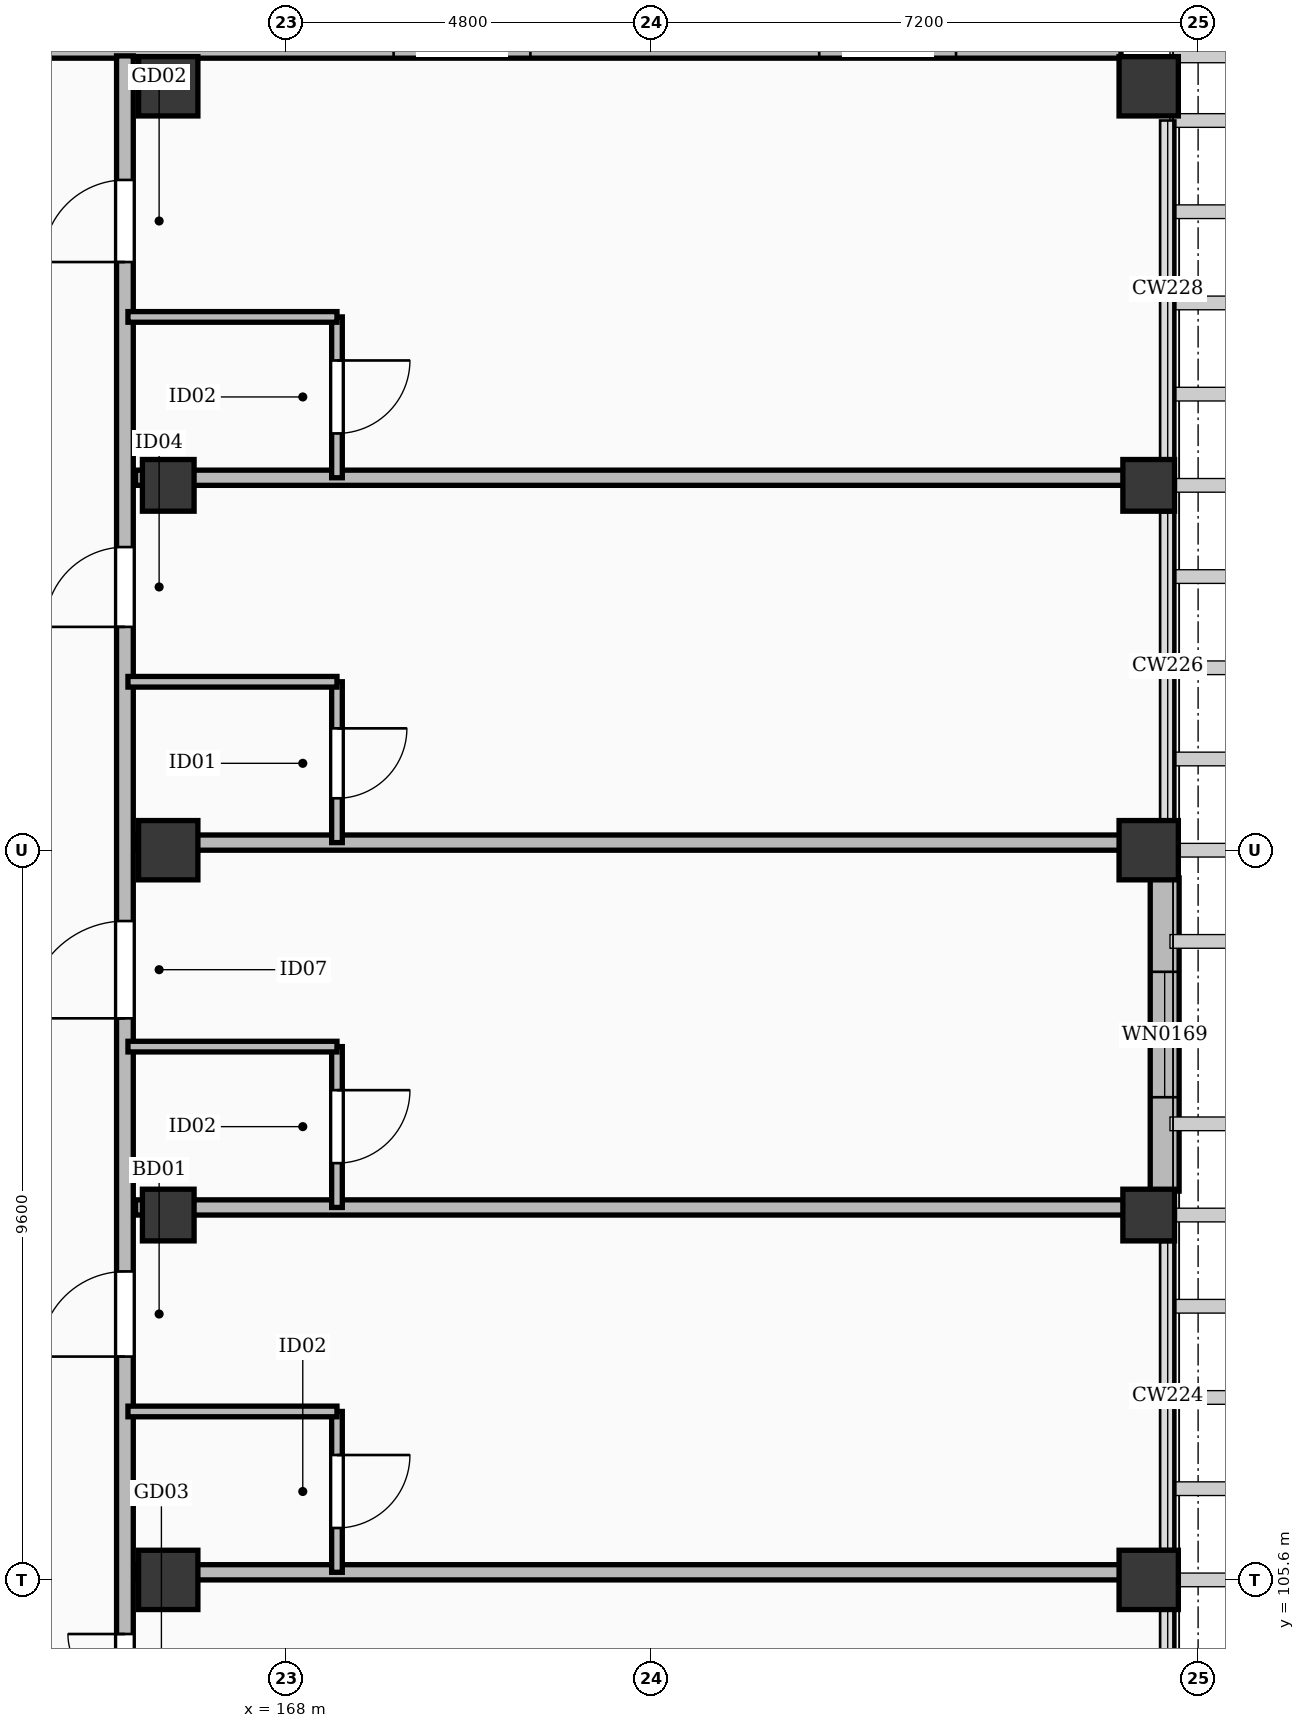
"""IFC4 building model, lengths in metres.
Left out: names, types, materials, properties, quantities, classifications, styles, units other than length and angle.
Written with IfcOpenShell. Run it as: python <this file> out.ifc"""

import sys

from ifc_helpers import new_model, si_unit, direction, frame, frame_2d, origin, origin_2d, place, context, subcontext, project, spatial, rectangle, extrude, element, fill, save


model = new_model("IFC4")
c1 = context("Model", 3, precision=1e-05, world=origin(), true_north=direction((0.0, 1.0)))
c2 = subcontext(c1, "Body", "Model", "MODEL_VIEW")
j1 = project(units=[si_unit("LENGTHUNIT", "METRE"), si_unit("PLANEANGLEUNIT", "RADIAN")], contexts=[c1])
p1 = place(None, origin())
s1 = spatial("IfcSite", under=j1, at=p1, CompositionType="ELEMENT")
p2 = place(p1, origin())
s2 = spatial("IfcBuilding", under=s1, at=p2, CompositionType="ELEMENT")
p3 = place(p2, frame((0.0, 0.0, 24.6)))
s3 = spatial("IfcBuildingStorey", under=s2, at=p3, CompositionType="ELEMENT", Elevation=24.6)
for number, where, z_axis, x_axis in (
    (1, (166.45, 105.6, 0.0), (0.0, 0.0, 1.0), (1.0, 0.0, 0.0)),
    (2, (166.45, 115.2, 0.0), (0.0, 0.0, 1.0), (1.0, 0.0, 0.0)),
    (3, (166.45, 125.25, 0.0), (0.0, 0.0, 1.0), (1.0, 0.0, 0.0)),
    (4, (179.35, 105.6, 0.0), (0.0, 0.0, 1.0), (1.0, 0.0, 0.0)),
    (5, (179.35, 115.2, 0.0), (0.0, 0.0, 1.0), (1.0, 0.0, 0.0)),
    (6, (179.35, 125.25, 0.0), (0.0, 0.0, 1.0), (1.0, 0.0, 0.0)),
):
    element("IfcColumn", number, at=place(p3, frame(where, z_axis=z_axis, x_axis=x_axis)), inside=s3, PredefinedType="COLUMN", context=c2, shape_type="SweptSolid", body=[
        extrude(rectangle(XDim=0.78, YDim=0.78, at=origin_2d()), origin(), (0.0, 0.0, 1.0), 3.6),
    ])
for number, where, z_axis, x_axis in (
    (7, (166.45, 110.4, 0.0), (0.0, 0.0, 1.0), (1.0, 0.0, 0.0)),
    (8, (166.45, 120.0, 0.0), (0.0, 0.0, 1.0), (1.0, 0.0, 0.0)),
    (9, (179.35, 110.4, 0.0), (0.0, 0.0, 1.0), (1.0, 0.0, 0.0)),
    (10, (179.35, 120.0, 0.0), (0.0, 0.0, 1.0), (1.0, 0.0, 0.0)),
):
    element("IfcColumn", number, at=place(p3, frame(where, z_axis=z_axis, x_axis=x_axis)), inside=s3, PredefinedType="COLUMN", context=c2, shape_type="SweptSolid", body=[
        extrude(rectangle(XDim=0.68, YDim=0.68, at=origin_2d()), origin(), (0.0, 0.0, 1.0), 3.6),
    ])
p4 = place(p3, frame((149.815, 125.81, 0.0), z_axis=(0.0, 0.0, 1.0), x_axis=(1.0, 0.0, 0.0)))
e11 = element("IfcWall", 11, at=p4, inside=s3, PredefinedType="SOLIDWALL", context=c2, shape_type="SweptSolid", body=[
    extrude(rectangle(XDim=29.17, YDim=0.38, at=frame_2d((14.585, 0.0))), origin(), (0.0, 0.0, 1.0), 3.34),
])
p5 = place(p4, frame((3.6, 0.0, 0.55)))
e12 = element("IfcOpeningElement", 12, at=p5, cuts=e11, PredefinedType="OPENING", context=c2, shape_type="SweptSolid", body=[
    extrude(rectangle(XDim=1.8, YDim=1.76, at=frame_2d((0.9, 0.88))), frame((0.0, 0.202, 0.0), z_axis=(0.0, -1.0, 0.0), x_axis=(1.0, 0.0, 0.0)), (0.0, 0.0, 1.0), 0.404),
])
p6 = place(p4, frame((9.2, 0.0, 0.55)))
e13 = element("IfcOpeningElement", 13, at=p6, cuts=e11, PredefinedType="OPENING", context=c2, shape_type="SweptSolid", body=[
    extrude(rectangle(XDim=1.8, YDim=1.76, at=frame_2d((0.9, 0.88))), frame((0.0, 0.202, 0.0), z_axis=(0.0, -1.0, 0.0), x_axis=(1.0, 0.0, 0.0)), (0.0, 0.0, 1.0), 0.404),
])
p7 = place(p4, frame((19.6, 0.0, 0.55)))
e14 = element("IfcOpeningElement", 14, at=p7, cuts=e11, PredefinedType="OPENING", context=c2, shape_type="SweptSolid", body=[
    extrude(rectangle(XDim=1.8, YDim=1.76, at=frame_2d((0.9, 0.88))), frame((0.0, 0.202, 0.0), z_axis=(0.0, -1.0, 0.0), x_axis=(1.0, 0.0, 0.0)), (0.0, 0.0, 1.0), 0.404),
])
p8 = place(p4, frame((25.2, 0.0, 0.55)))
e15 = element("IfcOpeningElement", 15, at=p8, cuts=e11, PredefinedType="OPENING", context=c2, shape_type="SweptSolid", body=[
    extrude(rectangle(XDim=1.8, YDim=1.76, at=frame_2d((0.9, 0.88))), frame((0.0, 0.202, 0.0), z_axis=(0.0, -1.0, 0.0), x_axis=(1.0, 0.0, 0.0)), (0.0, 0.0, 1.0), 0.404),
])
p9 = place(p3, frame((179.56, 114.835, 0.0), z_axis=(0.0, 0.0, 1.0), x_axis=(0.0, -1.0, 0.0)))
e16 = element("IfcWall", 16, at=p9, inside=s3, PredefinedType="SOLIDWALL", context=c2, shape_type="SweptSolid", body=[
    extrude(rectangle(XDim=4.12, YDim=0.38, at=frame_2d((2.06, 0.0))), origin(), (0.0, 0.0, 1.0), 2.582),
])
p10 = place(p9, frame((1.235, 0.0, 0.55)))
e17 = element("IfcOpeningElement", 17, at=p10, cuts=e16, PredefinedType="OPENING", context=c2, shape_type="SweptSolid", body=[
    extrude(rectangle(XDim=1.65, YDim=1.75, at=frame_2d((0.825, 0.875))), frame((0.0, 0.202, 0.0), z_axis=(0.0, -1.0, 0.0), x_axis=(1.0, 0.0, 0.0)), (0.0, 0.0, 1.0), 0.404),
])
p11 = place(p3, frame((165.88, 65.4, 0.0), z_axis=(0.0, 0.0, 1.0), x_axis=(0.0, 1.0, 0.0)))
e18 = element("IfcWall", 18, at=p11, inside=s3, PredefinedType="PARTITIONING", context=c2, shape_type="SweptSolid", body=[
    extrude(rectangle(XDim=60.25, YDim=0.22, at=frame_2d((30.125, 0.0))), origin(), (0.0, 0.0, 1.0), 2.582),
])
p12 = place(p11, frame((4.738, 0.0, 0.0)))
e19 = element("IfcOpeningElement", 19, at=p12, cuts=e18, PredefinedType="OPENING", context=c2, shape_type="SweptSolid", body=[
    extrude(rectangle(XDim=1.02, YDim=2.2, at=frame_2d((0.51, 1.1))), frame((0.0, 0.122, 0.0), z_axis=(0.0, -1.0, 0.0), x_axis=(1.0, 0.0, 0.0)), (0.0, 0.0, 1.0), 0.244),
])
p13 = place(p11, frame((9.188, 0.0, 0.0)))
e20 = element("IfcOpeningElement", 20, at=p13, cuts=e18, PredefinedType="OPENING", context=c2, shape_type="SweptSolid", body=[
    extrude(rectangle(XDim=1.5, YDim=2.3, at=frame_2d((0.75, 1.15))), frame((0.0, 0.122, 0.0), z_axis=(0.0, -1.0, 0.0), x_axis=(1.0, 0.0, 0.0)), (0.0, 0.0, 1.0), 0.244),
])
p14 = place(p11, frame((14.338, 0.0, 0.0)))
e21 = element("IfcOpeningElement", 21, at=p14, cuts=e18, PredefinedType="OPENING", context=c2, shape_type="SweptSolid", body=[
    extrude(rectangle(XDim=1.12, YDim=2.15, at=frame_2d((0.56, 1.075))), frame((0.0, 0.122, 0.0), z_axis=(0.0, -1.0, 0.0), x_axis=(1.0, 0.0, 0.0)), (0.0, 0.0, 1.0), 0.244),
])
p15 = place(p11, frame((18.788, 0.0, 0.0)))
e22 = element("IfcOpeningElement", 22, at=p15, cuts=e18, PredefinedType="OPENING", context=c2, shape_type="SweptSolid", body=[
    extrude(rectangle(XDim=1.28, YDim=2.16, at=frame_2d((0.64, 1.08))), frame((0.0, 0.122, 0.0), z_axis=(0.0, -1.0, 0.0), x_axis=(1.0, 0.0, 0.0)), (0.0, 0.0, 1.0), 0.244),
])
p16 = place(p11, frame((23.938, 0.0, 0.0)))
e23 = element("IfcOpeningElement", 23, at=p16, cuts=e18, PredefinedType="OPENING", context=c2, shape_type="SweptSolid", body=[
    extrude(rectangle(XDim=1.05, YDim=2.18, at=frame_2d((0.525, 1.09))), frame((0.0, 0.122, 0.0), z_axis=(0.0, -1.0, 0.0), x_axis=(1.0, 0.0, 0.0)), (0.0, 0.0, 1.0), 0.244),
])
p17 = place(p11, frame((28.738, 0.0, 0.0)))
e24 = element("IfcOpeningElement", 24, at=p17, cuts=e18, PredefinedType="OPENING", context=c2, shape_type="SweptSolid", body=[
    extrude(rectangle(XDim=1.08, YDim=2.25, at=frame_2d((0.54, 1.125))), frame((0.0, 0.122, 0.0), z_axis=(0.0, -1.0, 0.0), x_axis=(1.0, 0.0, 0.0)), (0.0, 0.0, 1.0), 0.244),
])
p18 = place(p11, frame((33.538, 0.0, 0.0)))
e25 = element("IfcOpeningElement", 25, at=p18, cuts=e18, PredefinedType="OPENING", context=c2, shape_type="SweptSolid", body=[
    extrude(rectangle(XDim=1.02, YDim=2.2, at=frame_2d((0.51, 1.1))), frame((0.0, 0.122, 0.0), z_axis=(0.0, -1.0, 0.0), x_axis=(1.0, 0.0, 0.0)), (0.0, 0.0, 1.0), 0.244),
])
p19 = place(p11, frame((37.988, 0.0, 0.0)))
e26 = element("IfcOpeningElement", 26, at=p19, cuts=e18, PredefinedType="OPENING", context=c2, shape_type="SweptSolid", body=[
    extrude(rectangle(XDim=1.5, YDim=2.3, at=frame_2d((0.75, 1.15))), frame((0.0, 0.122, 0.0), z_axis=(0.0, -1.0, 0.0), x_axis=(1.0, 0.0, 0.0)), (0.0, 0.0, 1.0), 0.244),
])
p20 = place(p11, frame((43.138, 0.0, 0.0)))
e27 = element("IfcOpeningElement", 27, at=p20, cuts=e18, PredefinedType="OPENING", context=c2, shape_type="SweptSolid", body=[
    extrude(rectangle(XDim=1.12, YDim=2.15, at=frame_2d((0.56, 1.075))), frame((0.0, 0.122, 0.0), z_axis=(0.0, -1.0, 0.0), x_axis=(1.0, 0.0, 0.0)), (0.0, 0.0, 1.0), 0.244),
])
p21 = place(p11, frame((47.588, 0.0, 0.0)))
e28 = element("IfcOpeningElement", 28, at=p21, cuts=e18, PredefinedType="OPENING", context=c2, shape_type="SweptSolid", body=[
    extrude(rectangle(XDim=1.28, YDim=2.16, at=frame_2d((0.64, 1.08))), frame((0.0, 0.122, 0.0), z_axis=(0.0, -1.0, 0.0), x_axis=(1.0, 0.0, 0.0)), (0.0, 0.0, 1.0), 0.244),
])
p22 = place(p11, frame((52.738, 0.0, 0.0)))
e29 = element("IfcOpeningElement", 29, at=p22, cuts=e18, PredefinedType="OPENING", context=c2, shape_type="SweptSolid", body=[
    extrude(rectangle(XDim=1.05, YDim=2.18, at=frame_2d((0.525, 1.09))), frame((0.0, 0.122, 0.0), z_axis=(0.0, -1.0, 0.0), x_axis=(1.0, 0.0, 0.0)), (0.0, 0.0, 1.0), 0.244),
])
p23 = place(p11, frame((57.538, 0.0, 0.0)))
e30 = element("IfcOpeningElement", 30, at=p23, cuts=e18, PredefinedType="OPENING", context=c2, shape_type="SweptSolid", body=[
    extrude(rectangle(XDim=1.08, YDim=2.25, at=frame_2d((0.54, 1.125))), frame((0.0, 0.122, 0.0), z_axis=(0.0, -1.0, 0.0), x_axis=(1.0, 0.0, 0.0)), (0.0, 0.0, 1.0), 0.244),
])
p24 = place(p3, frame((166.02, 105.7, 0.0), z_axis=(0.0, 0.0, 1.0), x_axis=(1.0, 0.0, 0.0)))
e31 = element("IfcWall", 31, at=p24, inside=s3, PredefinedType="PARTITIONING", context=c2, shape_type="SweptSolid", body=[
    extrude(rectangle(XDim=13.23, YDim=0.2, at=frame_2d((6.615, 0.0))), origin(), (0.0, 0.0, 1.0), 2.582),
])
p25 = place(p3, frame((168.67, 105.7, 0.0), z_axis=(0.0, 0.0, 1.0), x_axis=(0.0, 1.0, 0.0)))
e32 = element("IfcWall", 32, at=p25, inside=s3, PredefinedType="PARTITIONING", context=c2, shape_type="SweptSolid", body=[
    extrude(rectangle(XDim=2.116, YDim=0.14, at=frame_2d((1.058, 0.0))), origin(), (0.0, 0.0, 1.0), 2.632),
])
p26 = place(p25, frame((0.583, 0.0, 0.0)))
e33 = element("IfcOpeningElement", 33, at=p26, cuts=e32, PredefinedType="OPENING", context=c2, shape_type="SweptSolid", body=[
    extrude(rectangle(XDim=0.96, YDim=2.12, at=frame_2d((0.48, 1.06))), frame((0.0, 0.082, 0.0), z_axis=(0.0, -1.0, 0.0), x_axis=(1.0, 0.0, 0.0)), (0.0, 0.0, 1.0), 0.164),
])
p27 = place(p3, frame((165.92, 107.816, 0.0), z_axis=(0.0, 0.0, 1.0), x_axis=(1.0, 0.0, 0.0)))
e34 = element("IfcWall", 34, at=p27, inside=s3, PredefinedType="PARTITIONING", context=c2, shape_type="SweptSolid", body=[
    extrude(rectangle(XDim=2.75, YDim=0.14, at=frame_2d((1.375, 0.0))), origin(), (0.0, 0.0, 1.0), 2.632),
])
p28 = place(p3, frame((166.02, 110.5, 0.0), z_axis=(0.0, 0.0, 1.0), x_axis=(1.0, 0.0, 0.0)))
e35 = element("IfcWall", 35, at=p28, inside=s3, PredefinedType="PARTITIONING", context=c2, shape_type="SweptSolid", body=[
    extrude(rectangle(XDim=13.23, YDim=0.2, at=frame_2d((6.615, 0.0))), origin(), (0.0, 0.0, 1.0), 2.582),
])
p29 = place(p3, frame((168.67, 110.5, 0.0), z_axis=(0.0, 0.0, 1.0), x_axis=(0.0, 1.0, 0.0)))
e36 = element("IfcWall", 36, at=p29, inside=s3, PredefinedType="PARTITIONING", context=c2, shape_type="SweptSolid", body=[
    extrude(rectangle(XDim=2.116, YDim=0.14, at=frame_2d((1.058, 0.0))), origin(), (0.0, 0.0, 1.0), 2.632),
])
p30 = place(p29, frame((0.583, 0.0, 0.0)))
e37 = element("IfcOpeningElement", 37, at=p30, cuts=e36, PredefinedType="OPENING", context=c2, shape_type="SweptSolid", body=[
    extrude(rectangle(XDim=0.96, YDim=2.12, at=frame_2d((0.48, 1.06))), frame((0.0, 0.082, 0.0), z_axis=(0.0, -1.0, 0.0), x_axis=(1.0, 0.0, 0.0)), (0.0, 0.0, 1.0), 0.164),
])
p31 = place(p3, frame((165.92, 112.616, 0.0), z_axis=(0.0, 0.0, 1.0), x_axis=(1.0, 0.0, 0.0)))
e38 = element("IfcWall", 38, at=p31, inside=s3, PredefinedType="PARTITIONING", context=c2, shape_type="SweptSolid", body=[
    extrude(rectangle(XDim=2.75, YDim=0.14, at=frame_2d((1.375, 0.0))), origin(), (0.0, 0.0, 1.0), 2.632),
])
p32 = place(p3, frame((166.02, 115.3, 0.0), z_axis=(0.0, 0.0, 1.0), x_axis=(1.0, 0.0, 0.0)))
e39 = element("IfcWall", 39, at=p32, inside=s3, PredefinedType="PARTITIONING", context=c2, shape_type="SweptSolid", body=[
    extrude(rectangle(XDim=13.23, YDim=0.2, at=frame_2d((6.615, 0.0))), origin(), (0.0, 0.0, 1.0), 2.582),
])
p33 = place(p3, frame((168.67, 115.3, 0.0), z_axis=(0.0, 0.0, 1.0), x_axis=(0.0, 1.0, 0.0)))
e40 = element("IfcWall", 40, at=p33, inside=s3, PredefinedType="PARTITIONING", context=c2, shape_type="SweptSolid", body=[
    extrude(rectangle(XDim=2.116, YDim=0.14, at=frame_2d((1.058, 0.0))), origin(), (0.0, 0.0, 1.0), 2.632),
])
p34 = place(p33, frame((0.583, 0.0, 0.0)))
e41 = element("IfcOpeningElement", 41, at=p34, cuts=e40, PredefinedType="OPENING", context=c2, shape_type="SweptSolid", body=[
    extrude(rectangle(XDim=0.92, YDim=2.1, at=frame_2d((0.46, 1.05))), frame((0.0, 0.082, 0.0), z_axis=(0.0, -1.0, 0.0), x_axis=(1.0, 0.0, 0.0)), (0.0, 0.0, 1.0), 0.164),
])
p35 = place(p3, frame((165.92, 117.416, 0.0), z_axis=(0.0, 0.0, 1.0), x_axis=(1.0, 0.0, 0.0)))
e42 = element("IfcWall", 42, at=p35, inside=s3, PredefinedType="PARTITIONING", context=c2, shape_type="SweptSolid", body=[
    extrude(rectangle(XDim=2.75, YDim=0.14, at=frame_2d((1.375, 0.0))), origin(), (0.0, 0.0, 1.0), 2.632),
])
p36 = place(p3, frame((166.02, 120.1, 0.0), z_axis=(0.0, 0.0, 1.0), x_axis=(1.0, 0.0, 0.0)))
e43 = element("IfcWall", 43, at=p36, inside=s3, PredefinedType="PARTITIONING", context=c2, shape_type="SweptSolid", body=[
    extrude(rectangle(XDim=13.23, YDim=0.2, at=frame_2d((6.615, 0.0))), origin(), (0.0, 0.0, 1.0), 2.582),
])
p37 = place(p3, frame((168.67, 120.1, 0.0), z_axis=(0.0, 0.0, 1.0), x_axis=(0.0, 1.0, 0.0)))
e44 = element("IfcWall", 44, at=p37, inside=s3, PredefinedType="PARTITIONING", context=c2, shape_type="SweptSolid", body=[
    extrude(rectangle(XDim=2.116, YDim=0.14, at=frame_2d((1.058, 0.0))), origin(), (0.0, 0.0, 1.0), 2.632),
])
p38 = place(p37, frame((0.583, 0.0, 0.0)))
e45 = element("IfcOpeningElement", 45, at=p38, cuts=e44, PredefinedType="OPENING", context=c2, shape_type="SweptSolid", body=[
    extrude(rectangle(XDim=0.96, YDim=2.12, at=frame_2d((0.48, 1.06))), frame((0.0, 0.082, 0.0), z_axis=(0.0, -1.0, 0.0), x_axis=(1.0, 0.0, 0.0)), (0.0, 0.0, 1.0), 0.164),
])
p39 = place(p3, frame((165.92, 122.216, 0.0), z_axis=(0.0, 0.0, 1.0), x_axis=(1.0, 0.0, 0.0)))
e46 = element("IfcWall", 46, at=p39, inside=s3, PredefinedType="PARTITIONING", context=c2, shape_type="SweptSolid", body=[
    extrude(rectangle(XDim=2.75, YDim=0.14, at=frame_2d((1.375, 0.0))), origin(), (0.0, 0.0, 1.0), 2.632),
])
p40 = place(p10, origin())
e47 = element("IfcWindow", 47, at=p40, inside=s3, PartitioningType="SINGLE_PANEL", PredefinedType="WINDOW", context=c2, shape_type="SweptSolid", body=[
    extrude(rectangle(XDim=1.65, YDim=1.75, at=frame_2d((0.825, 0.875))), frame((0.0, 0.03, 0.0), z_axis=(0.0, -1.0, 0.0), x_axis=(1.0, 0.0, 0.0)), (0.0, 0.0, 1.0), 0.06),
])
fill(e17, e47)
p41 = place(p19, origin())
e48 = element("IfcDoor", 48, at=p41, inside=s3, OperationType="DOUBLE_DOOR_SINGLE_SWING", PredefinedType="DOOR", context=c2, shape_type="SweptSolid", body=[
    extrude(rectangle(XDim=1.5, YDim=2.3, at=frame_2d((0.75, 1.15))), frame((0.0, 0.025, 0.0), z_axis=(0.0, -1.0, 0.0), x_axis=(1.0, 0.0, 0.0)), (0.0, 0.0, 1.0), 0.05),
])
fill(e26, e48)
p42 = place(p20, origin())
e49 = element("IfcDoor", 49, at=p42, inside=s3, OperationType="SINGLE_SWING_LEFT", PredefinedType="DOOR", context=c2, shape_type="SweptSolid", body=[
    extrude(rectangle(XDim=1.12, YDim=2.15, at=frame_2d((0.56, 1.075))), frame((0.0, 0.025, 0.0), z_axis=(0.0, -1.0, 0.0), x_axis=(1.0, 0.0, 0.0)), (0.0, 0.0, 1.0), 0.05),
])
fill(e27, e49)
p43 = place(p26, frame((0.96, 0.0, 0.0), z_axis=(0.0, 0.0, 1.0), x_axis=(-1.0, 0.0, 0.0)))
e50 = element("IfcDoor", 50, at=p43, inside=s3, OperationType="SINGLE_SWING_RIGHT", PredefinedType="DOOR", context=c2, shape_type="SweptSolid", body=[
    extrude(rectangle(XDim=0.96, YDim=2.12, at=frame_2d((0.48, 1.06))), frame((0.0, 0.025, 0.0), z_axis=(0.0, -1.0, 0.0), x_axis=(1.0, 0.0, 0.0)), (0.0, 0.0, 1.0), 0.05),
])
fill(e33, e50)
p44 = place(p21, origin())
e51 = element("IfcDoor", 51, at=p44, inside=s3, OperationType="SINGLE_SWING_LEFT", PredefinedType="DOOR", context=c2, shape_type="SweptSolid", body=[
    extrude(rectangle(XDim=1.28, YDim=2.16, at=frame_2d((0.64, 1.08))), frame((0.0, 0.025, 0.0), z_axis=(0.0, -1.0, 0.0), x_axis=(1.0, 0.0, 0.0)), (0.0, 0.0, 1.0), 0.05),
])
fill(e28, e51)
p45 = place(p30, frame((0.96, 0.0, 0.0), z_axis=(0.0, 0.0, 1.0), x_axis=(-1.0, 0.0, 0.0)))
e52 = element("IfcDoor", 52, at=p45, inside=s3, OperationType="SINGLE_SWING_RIGHT", PredefinedType="DOOR", context=c2, shape_type="SweptSolid", body=[
    extrude(rectangle(XDim=0.96, YDim=2.12, at=frame_2d((0.48, 1.06))), frame((0.0, 0.025, 0.0), z_axis=(0.0, -1.0, 0.0), x_axis=(1.0, 0.0, 0.0)), (0.0, 0.0, 1.0), 0.05),
])
fill(e37, e52)
p46 = place(p22, origin())
e53 = element("IfcDoor", 53, at=p46, inside=s3, OperationType="SINGLE_SWING_LEFT", PredefinedType="DOOR", context=c2, shape_type="SweptSolid", body=[
    extrude(rectangle(XDim=1.05, YDim=2.18, at=frame_2d((0.525, 1.09))), frame((0.0, 0.025, 0.0), z_axis=(0.0, -1.0, 0.0), x_axis=(1.0, 0.0, 0.0)), (0.0, 0.0, 1.0), 0.05),
])
fill(e29, e53)
p47 = place(p34, frame((0.92, 0.0, 0.0), z_axis=(0.0, 0.0, 1.0), x_axis=(-1.0, 0.0, 0.0)))
e54 = element("IfcDoor", 54, at=p47, inside=s3, OperationType="SINGLE_SWING_RIGHT", PredefinedType="DOOR", context=c2, shape_type="SweptSolid", body=[
    extrude(rectangle(XDim=0.92, YDim=2.1, at=frame_2d((0.46, 1.05))), frame((0.0, 0.025, 0.0), z_axis=(0.0, -1.0, 0.0), x_axis=(1.0, 0.0, 0.0)), (0.0, 0.0, 1.0), 0.05),
])
fill(e41, e54)
p48 = place(p23, origin())
e55 = element("IfcDoor", 55, at=p48, inside=s3, OperationType="SINGLE_SWING_LEFT", PredefinedType="DOOR", context=c2, shape_type="SweptSolid", body=[
    extrude(rectangle(XDim=1.08, YDim=2.25, at=frame_2d((0.54, 1.125))), frame((0.0, 0.025, 0.0), z_axis=(0.0, -1.0, 0.0), x_axis=(1.0, 0.0, 0.0)), (0.0, 0.0, 1.0), 0.05),
])
fill(e30, e55)
p49 = place(p38, frame((0.96, 0.0, 0.0), z_axis=(0.0, 0.0, 1.0), x_axis=(-1.0, 0.0, 0.0)))
e56 = element("IfcDoor", 56, at=p49, inside=s3, OperationType="SINGLE_SWING_RIGHT", PredefinedType="DOOR", context=c2, shape_type="SweptSolid", body=[
    extrude(rectangle(XDim=0.96, YDim=2.12, at=frame_2d((0.48, 1.06))), frame((0.0, 0.025, 0.0), z_axis=(0.0, -1.0, 0.0), x_axis=(1.0, 0.0, 0.0)), (0.0, 0.0, 1.0), 0.05),
])
fill(e45, e56)
save(model, sys.argv[1])
